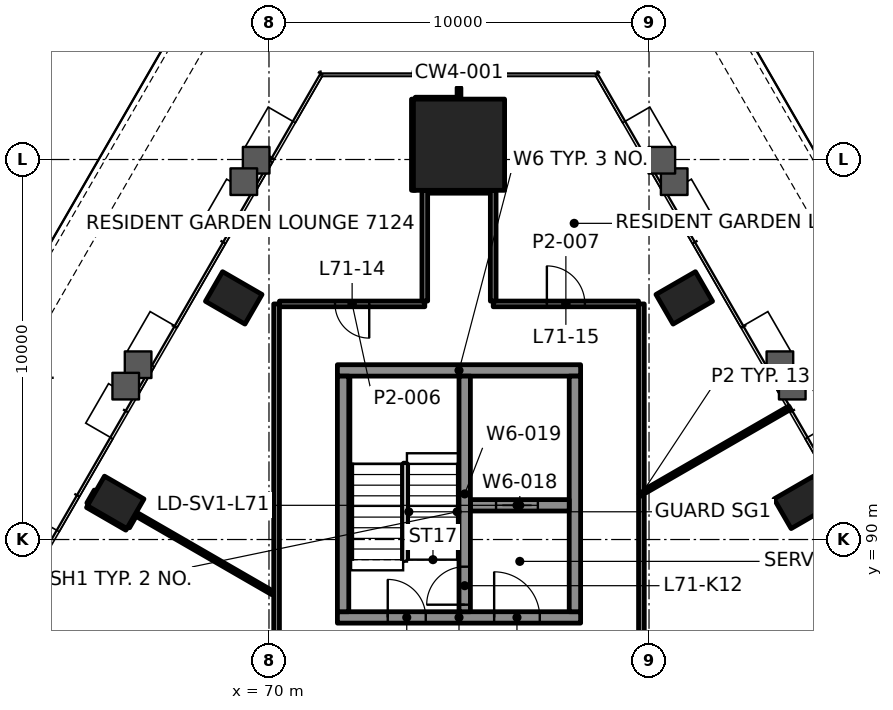
"""IFC4 building model, lengths in metres.
Left out: names, types, materials, properties, quantities, classifications, styles, units other than length and angle.
Written with IfcOpenShell. Run it as: python <this file> out.ifc"""

import sys

from ifc_helpers import new_model, si_unit, direction, frame, frame_2d, origin, origin_2d, place, context, subcontext, project, spatial, rectangle, hollow_rectangle, extrude, element, fill, save


model = new_model("IFC4")
c1 = context("Model", 3, precision=1e-05, world=origin(), true_north=direction((0.0, 1.0)))
c2 = subcontext(c1, "Body", "Model", "MODEL_VIEW")
j1 = project(units=[si_unit("LENGTHUNIT", "METRE"), si_unit("PLANEANGLEUNIT", "RADIAN")], contexts=[c1])
p1 = place(None, origin())
s1 = spatial("IfcSite", under=j1, at=p1, CompositionType="ELEMENT")
p2 = place(p1, origin())
s2 = spatial("IfcBuilding", under=s1, at=p2, CompositionType="ELEMENT")
p3 = place(p2, frame((0.0, 0.0, 295.1)))
s3 = spatial("IfcBuildingStorey", under=s2, at=p3, CompositionType="ELEMENT", Elevation=295.1)
p4 = place(p3, frame((75.0, 100.389, 0.0), z_axis=(0.0, 0.0, 1.0), x_axis=(-1.0, 0.0, 0.0)))
e1 = element("IfcColumn", 1, at=p4, inside=s3, PredefinedType="COLUMN", context=c2, shape_type="SweptSolid", body=[
    extrude(rectangle(XDim=2.4, YDim=2.4, at=origin_2d()), origin(), (0.0, 0.0, 1.0), 3.5),
])
for number, where, z_axis, x_axis in (
    (2, (84.034, 90.978, -0.0), (0.0, 0.0, 1.0), (-0.5, 0.866, 0.0)),
    (3, (80.927, 96.358, -0.0), (0.0, 0.0, 1.0), (-0.5, 0.866, 0.0)),
    (4, (69.073, 96.358, -0.0), (0.0, 0.0, 1.0), (-0.5, -0.866, 0.0)),
    (5, (65.966, 90.978, -0.0), (0.0, 0.0, 1.0), (-0.5, -0.866, 0.0)),
):
    element("IfcColumn", number, at=place(p3, frame(where, z_axis=z_axis, x_axis=x_axis)), inside=s3, PredefinedType="COLUMN", context=c2, shape_type="SweptSolid", body=[
        extrude(hollow_rectangle(XDim=0.9, YDim=1.2, WallThickness=0.06, at=origin_2d()), origin(), (0.0, 0.0, 1.0), 3.5),
    ])
p5 = place(p3, frame((71.8, 87.95, 0.0), z_axis=(0.0, 0.0, 1.0), x_axis=(1.0, 0.0, 0.0)))
e6 = element("IfcWall", 6, at=p5, inside=s3, PredefinedType="SHEAR", context=c2, shape_type="SweptSolid", body=[
    extrude(rectangle(XDim=6.4, YDim=0.3, at=frame_2d((3.2, 0.0))), origin(), (0.0, 0.0, 1.0), 3.3),
])
p6 = place(p5, frame((1.325, 0.0, 0.0)))
e7 = element("IfcOpeningElement", 7, at=p6, cuts=e6, PredefinedType="OPENING", context=c2, shape_type="SweptSolid", body=[
    extrude(rectangle(XDim=1.0, YDim=2.1, at=frame_2d((0.5, 1.05))), frame((0.0, 0.16, 0.0), z_axis=(0.0, -1.0, 0.0), x_axis=(1.0, 0.0, 0.0)), (0.0, 0.0, 1.0), 0.32),
])
p7 = place(p5, frame((4.125, 0.0, 0.0)))
e8 = element("IfcOpeningElement", 8, at=p7, cuts=e6, PredefinedType="OPENING", context=c2, shape_type="SweptSolid", body=[
    extrude(rectangle(XDim=1.2, YDim=2.1, at=frame_2d((0.6, 1.05))), frame((0.0, 0.16, 0.0), z_axis=(0.0, -1.0, 0.0), x_axis=(1.0, 0.0, 0.0)), (0.0, 0.0, 1.0), 0.32),
])
p8 = place(p3, frame((71.8, 94.45, 0.0), z_axis=(0.0, 0.0, 1.0), x_axis=(1.0, 0.0, 0.0)))
e9 = element("IfcWall", 9, at=p8, inside=s3, PredefinedType="SHEAR", context=c2, shape_type="SweptSolid", body=[
    extrude(rectangle(XDim=6.4, YDim=0.3, at=frame_2d((3.2, 0.0))), origin(), (0.0, 0.0, 1.0), 3.3),
])
for number, where, z_axis, x_axis in (
    (10, (71.95, 88.1, 0.0), (0.0, 0.0, 1.0), (0.0, 1.0, 0.0)),
    (11, (78.05, 88.1, 0.0), (0.0, 0.0, 1.0), (0.0, 1.0, 0.0)),
):
    element("IfcWall", number, at=place(p3, frame(where, z_axis=z_axis, x_axis=x_axis)), inside=s3, PredefinedType="SHEAR", context=c2, shape_type="SweptSolid", body=[
        extrude(rectangle(XDim=6.2, YDim=0.3, at=frame_2d((3.1, 0.0))), origin(), (0.0, 0.0, 1.0), 3.3),
    ])
p9 = place(p3, frame((75.3, 90.9, 0.0), z_axis=(0.0, 0.0, 1.0), x_axis=(1.0, 0.0, 0.0)))
e12 = element("IfcWall", 12, at=p9, inside=s3, PredefinedType="SHEAR", context=c2, shape_type="SweptSolid", body=[
    extrude(rectangle(XDim=2.6, YDim=0.3, at=frame_2d((1.3, 0.0))), origin(), (0.0, 0.0, 1.0), 3.3),
])
p10 = place(p9, frame((0.675, 0.0, 0.0)))
e13 = element("IfcOpeningElement", 13, at=p10, cuts=e12, PredefinedType="OPENING", context=c2, shape_type="SweptSolid", body=[
    extrude(rectangle(XDim=1.1, YDim=2.1, at=frame_2d((0.55, 1.05))), frame((0.0, 0.16, 0.0), z_axis=(0.0, -1.0, 0.0), x_axis=(1.0, 0.0, 0.0)), (0.0, 0.0, 1.0), 0.32),
])
p11 = place(p3, frame((75.15, 88.1, 0.0), z_axis=(0.0, 0.0, 1.0), x_axis=(0.0, 1.0, 0.0)))
e14 = element("IfcWall", 14, at=p11, inside=s3, PredefinedType="SHEAR", context=c2, shape_type="SweptSolid", body=[
    extrude(rectangle(XDim=6.2, YDim=0.3, at=frame_2d((3.1, 0.0))), origin(), (0.0, 0.0, 1.0), 3.3),
])
p12 = place(p11, frame((0.185, 0.0, 0.0)))
e15 = element("IfcOpeningElement", 15, at=p12, cuts=e14, PredefinedType="OPENING", context=c2, shape_type="SweptSolid", body=[
    extrude(rectangle(XDim=1.0, YDim=2.1, at=frame_2d((0.5, 1.05))), frame((0.0, 0.16, 0.0), z_axis=(0.0, -1.0, 0.0), x_axis=(1.0, 0.0, 0.0)), (0.0, 0.0, 1.0), 0.32),
])
p13 = place(p3, frame((74.1, 96.2, 0.0), z_axis=(0.0, 0.0, 1.0), x_axis=(-1.0, 0.0, 0.0)))
e16 = element("IfcWall", 16, at=p13, inside=s3, PredefinedType="PARTITIONING", context=c2, shape_type="SweptSolid", body=[
    extrude(rectangle(XDim=3.825, YDim=0.15, at=frame_2d((1.912, 0.0))), origin(), (0.0, 0.0, 1.0), 2.7),
])
p14 = place(p13, frame((1.462, 0.0, 0.0)))
e17 = element("IfcOpeningElement", 17, at=p14, cuts=e16, PredefinedType="OPENING", context=c2, shape_type="SweptSolid", body=[
    extrude(rectangle(XDim=0.9, YDim=2.1, at=frame_2d((0.45, 1.05))), frame((0.0, 0.085, 0.0), z_axis=(0.0, -1.0, 0.0), x_axis=(1.0, 0.0, 0.0)), (0.0, 0.0, 1.0), 0.17),
])
p15 = place(p3, frame((75.9, 96.2, 0.0), z_axis=(0.0, 0.0, 1.0), x_axis=(1.0, 0.0, 0.0)))
e18 = element("IfcWall", 18, at=p15, inside=s3, PredefinedType="PARTITIONING", context=c2, shape_type="SweptSolid", body=[
    extrude(rectangle(XDim=3.825, YDim=0.15, at=frame_2d((1.912, 0.0))), origin(), (0.0, 0.0, 1.0), 2.7),
])
p16 = place(p15, frame((1.412, 0.0, 0.0)))
e19 = element("IfcOpeningElement", 19, at=p16, cuts=e18, PredefinedType="OPENING", context=c2, shape_type="SweptSolid", body=[
    extrude(rectangle(XDim=1.0, YDim=2.1, at=frame_2d((0.5, 1.05))), frame((0.0, 0.085, 0.0), z_axis=(0.0, -1.0, 0.0), x_axis=(1.0, 0.0, 0.0)), (0.0, 0.0, 1.0), 0.17),
])
p17 = place(p3, frame((74.18, 99.189, 0.0), z_axis=(0.0, 0.0, 1.0), x_axis=(1.0, 0.0, 0.0)))
e20 = element("IfcWall", 20, at=p17, inside=s3, PredefinedType="PARTITIONING", context=c2, shape_type="SweptSolid", body=[
    extrude(rectangle(XDim=1.644, YDim=0.15, at=frame_2d((0.822, 0.0))), origin(), (0.0, 0.0, 1.0), 2.697),
])
p18 = place(p3, frame((73.851, 101.589, 0.0), z_axis=(0.0, 0.0, 1.0), x_axis=(1.0, 0.0, 0.0)))
e21 = element("IfcWall", 21, at=p18, inside=s3, PredefinedType="PARTITIONING", context=c2, shape_type="SweptSolid", body=[
    extrude(rectangle(XDim=1.149, YDim=0.1, at=frame_2d((0.575, 0.0))), origin(), (0.0, 0.0, 1.0), 2.7),
])
p19 = place(p3, frame((79.901, 91.274, 0.0), z_axis=(0.0, 0.0, 1.0), x_axis=(0.86602077629, 0.50000801497, 0.0)))
e22 = element("IfcWall", 22, at=p19, inside=s3, PredefinedType="PARTITIONING", context=c2, shape_type="SweptSolid", body=[
    extrude(rectangle(XDim=4.391, YDim=0.1, at=frame_2d((2.196, 0.0))), origin(), (0.0, 0.0, 1.0), 2.7),
])
p20 = place(p3, frame((66.288, 90.333, 0.0), z_axis=(0.0, 0.0, 1.0), x_axis=(0.499620918551, 0.866244155967, 0.0)))
e23 = element("IfcWall", 23, at=p20, inside=s3, PredefinedType="PARTITIONING", context=c2, shape_type="SweptSolid", body=[
    extrude(rectangle(XDim=0.347, YDim=0.1, at=frame_2d((0.173, 0.0))), origin(), (0.0, 0.0, 1.0), 2.7),
])
p21 = place(p3, frame((65.251, 90.938, 0.0), z_axis=(0.0, 0.0, 1.0), x_axis=(0.500225704022, 0.865895054285, 0.0)))
e24 = element("IfcWall", 24, at=p21, inside=s3, PredefinedType="PARTITIONING", context=c2, shape_type="SweptSolid", body=[
    extrude(rectangle(XDim=0.392, YDim=0.1, at=frame_2d((0.196, 0.0))), origin(), (0.0, 0.0, 1.0), 2.7),
])
p22 = place(p3, frame((79.8, 86.2, 0.0), z_axis=(0.0, 0.0, 1.0), x_axis=(0.0, 1.0, 0.0)))
e25 = element("IfcWall", 25, at=p22, inside=s3, PredefinedType="PARTITIONING", context=c2, shape_type="SweptSolid", body=[
    extrude(rectangle(XDim=9.999, YDim=0.15, at=frame_2d((5.0, 0.0))), origin(), (0.0, 0.0, 1.0), 2.7),
])
p23 = place(p3, frame((75.9, 96.275, 0.0), z_axis=(0.0, 0.0, 1.0), x_axis=(0.0, 1.0, 0.0)))
e26 = element("IfcWall", 26, at=p23, inside=s3, PredefinedType="PARTITIONING", context=c2, shape_type="SweptSolid", body=[
    extrude(rectangle(XDim=2.914, YDim=0.15, at=frame_2d((1.457, 0.0))), origin(), (0.0, 0.0, 1.0), 2.7),
])
p24 = place(p3, frame((75.0, 101.639, 0.0), z_axis=(0.0, 0.0, 1.0), x_axis=(0.0, 1.0, 0.0)))
e27 = element("IfcWall", 27, at=p24, inside=s3, PredefinedType="PARTITIONING", context=c2, shape_type="SweptSolid", body=[
    extrude(rectangle(XDim=0.25, YDim=0.1, at=frame_2d((0.125, 0.0))), origin(), (0.0, 0.0, 1.0), 2.7),
])
p25 = place(p3, frame((74.1, 96.275, 0.0), z_axis=(0.0, 0.0, 1.0), x_axis=(0.0, 1.0, 0.0)))
e28 = element("IfcWall", 28, at=p25, inside=s3, PredefinedType="PARTITIONING", context=c2, shape_type="SweptSolid", body=[
    extrude(rectangle(XDim=2.914, YDim=0.15, at=frame_2d((1.457, 0.0))), origin(), (0.0, 0.0, 1.0), 2.7),
])
p26 = place(p3, frame((73.8, 99.19, 0.0), z_axis=(0.0, 0.0, 1.0), x_axis=(0.0, 1.0, 0.0)))
e29 = element("IfcWall", 29, at=p26, inside=s3, PredefinedType="PARTITIONING", context=c2, shape_type="SweptSolid", body=[
    extrude(rectangle(XDim=2.399, YDim=0.1, at=frame_2d((1.199, 0.0))), origin(), (0.0, 0.0, 1.0), 2.7),
])
p27 = place(p3, frame((70.2, 86.202, 0.0), z_axis=(0.0, 0.0, 1.0), x_axis=(0.0, 1.0, 0.0)))
e30 = element("IfcWall", 30, at=p27, inside=s3, PredefinedType="PARTITIONING", context=c2, shape_type="SweptSolid", body=[
    extrude(rectangle(XDim=9.998, YDim=0.15, at=frame_2d((4.999, 0.0))), origin(), (0.0, 0.0, 1.0), 2.7),
])
p28 = place(p3, frame((70.099, 88.592, 0.0), z_axis=(0.0, 0.0, 1.0), x_axis=(-0.866045268016, 0.499965592563, 0.0)))
e31 = element("IfcWall", 31, at=p28, inside=s3, PredefinedType="PARTITIONING", context=c2, shape_type="SweptSolid", body=[
    extrude(rectangle(XDim=4.172, YDim=0.1, at=frame_2d((2.086, 0.0))), origin(), (0.0, 0.0, 1.0), 2.7),
])
p29 = place(p3, frame((66.258, 90.29, 0.0), z_axis=(0.0, 0.0, 1.0), x_axis=(-0.866032345022, 0.499987977232, 0.0)))
e32 = element("IfcWall", 32, at=p29, inside=s3, PredefinedType="PARTITIONING", context=c2, shape_type="SweptSolid", body=[
    extrude(rectangle(XDim=1.194, YDim=0.1, at=frame_2d((0.597, 0.0))), origin(), (0.0, 0.0, 1.0), 2.688),
])
p30 = place(p3, frame((90.75, 88.045, 0.0), z_axis=(0.0, 0.0, 1.0), x_axis=(-0.50000302904, 0.86602365496, 0.0)))
e33 = element("IfcWall", 33, at=p30, inside=s3, PredefinedType="SOLIDWALL", context=c2, shape_type="SweptSolid", body=[
    extrude(rectangle(XDim=19.734, YDim=0.8, at=frame_2d((9.867, 0.0))), origin(), (0.0, 0.0, 1.0), 0.9),
])
p31 = place(p3, frame((69.117, 105.135, 0.0), z_axis=(0.0, 0.0, 1.0), x_axis=(-0.500000972034, -0.86602484258, 0.0)))
e34 = element("IfcWall", 34, at=p31, inside=s3, PredefinedType="SOLIDWALL", context=c2, shape_type="SweptSolid", body=[
    extrude(rectangle(XDim=26.734, YDim=0.8, at=frame_2d((13.367, 0.0))), origin(), (0.0, 0.0, 1.0), 0.9),
])
p32 = place(p14, origin())
e35 = element("IfcDoor", 35, at=p32, inside=s3, OperationType="SINGLE_SWING_RIGHT", PredefinedType="DOOR", context=c2, shape_type="SweptSolid", body=[
    extrude(rectangle(XDim=0.9, YDim=2.1, at=frame_2d((0.45, 1.05))), frame((0.0, 0.025, 0.0), z_axis=(0.0, -1.0, 0.0), x_axis=(1.0, 0.0, 0.0)), (0.0, 0.0, 1.0), 0.05),
])
fill(e17, e35)
p33 = place(p16, origin())
e36 = element("IfcDoor", 36, at=p33, inside=s3, OperationType="SINGLE_SWING_RIGHT", PredefinedType="DOOR", context=c2, shape_type="SweptSolid", body=[
    extrude(rectangle(XDim=1.0, YDim=2.1, at=frame_2d((0.5, 1.05))), frame((0.0, 0.025, 0.0), z_axis=(0.0, -1.0, 0.0), x_axis=(1.0, 0.0, 0.0)), (0.0, 0.0, 1.0), 0.05),
])
fill(e19, e36)
p34 = place(p10, origin())
e37 = element("IfcDoor", 37, at=p34, inside=s3, OperationType="DOUBLE_DOOR_SLIDING", PredefinedType="DOOR", context=c2, shape_type="SweptSolid", body=[
    extrude(rectangle(XDim=1.1, YDim=2.1, at=frame_2d((0.55, 1.05))), frame((0.0, 0.025, 0.0), z_axis=(0.0, -1.0, 0.0), x_axis=(1.0, 0.0, 0.0)), (0.0, 0.0, 1.0), 0.05),
])
fill(e13, e37)
p35 = place(p6, origin())
e38 = element("IfcDoor", 38, at=p35, inside=s3, OperationType="SINGLE_SWING_RIGHT", PredefinedType="DOOR", context=c2, shape_type="SweptSolid", body=[
    extrude(rectangle(XDim=1.0, YDim=2.1, at=frame_2d((0.5, 1.05))), frame((0.0, 0.025, 0.0), z_axis=(0.0, -1.0, 0.0), x_axis=(1.0, 0.0, 0.0)), (0.0, 0.0, 1.0), 0.05),
])
fill(e7, e38)
p36 = place(p12, origin())
e39 = element("IfcDoor", 39, at=p36, inside=s3, OperationType="SINGLE_SWING_LEFT", PredefinedType="DOOR", context=c2, shape_type="SweptSolid", body=[
    extrude(rectangle(XDim=1.0, YDim=2.1, at=frame_2d((0.5, 1.05))), frame((0.0, 0.025, 0.0), z_axis=(0.0, -1.0, 0.0), x_axis=(1.0, 0.0, 0.0)), (0.0, 0.0, 1.0), 0.05),
])
fill(e15, e39)
p37 = place(p7, origin())
e40 = element("IfcDoor", 40, at=p37, inside=s3, OperationType="SINGLE_SWING_RIGHT", PredefinedType="DOOR", context=c2, shape_type="SweptSolid", body=[
    extrude(rectangle(XDim=1.2, YDim=2.1, at=frame_2d((0.6, 1.05))), frame((0.0, 0.025, 0.0), z_axis=(0.0, -1.0, 0.0), x_axis=(1.0, 0.0, 0.0)), (0.0, 0.0, 1.0), 0.05),
])
fill(e8, e40)
save(model, sys.argv[1])
